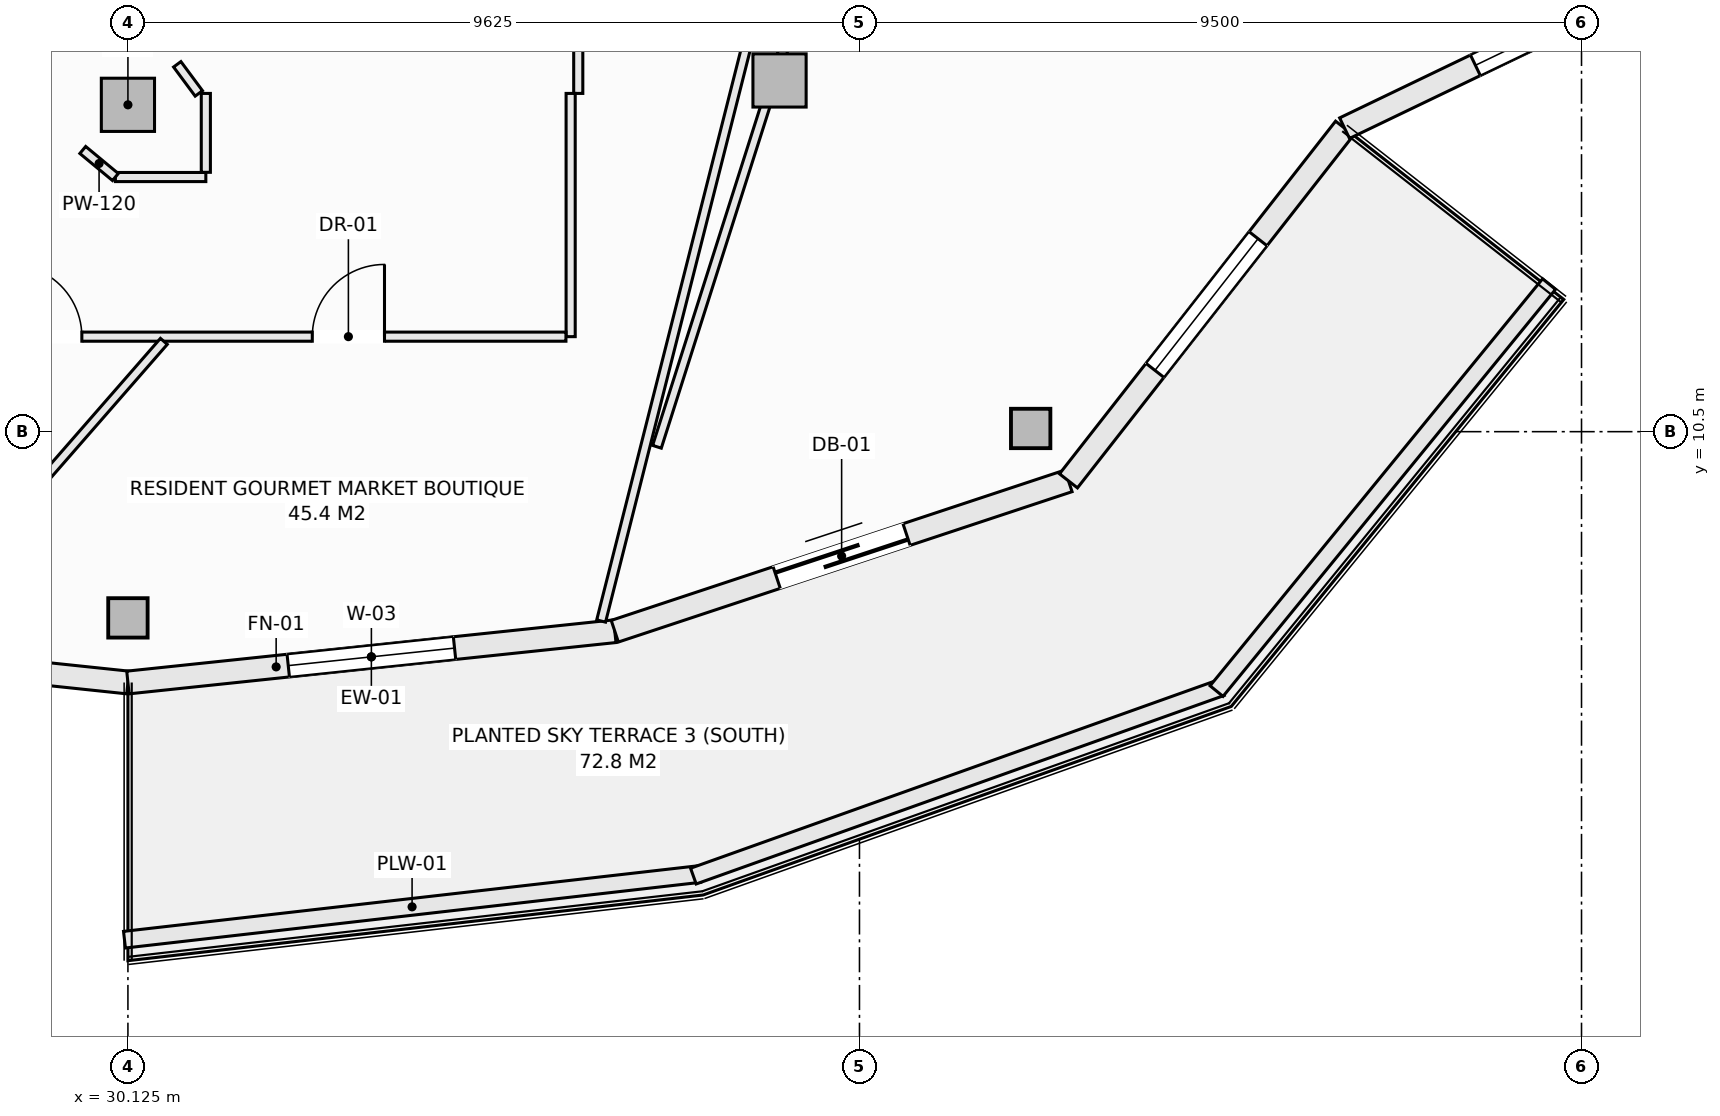
"""IFC4 building model, lengths in metres.
Left out: names, types, materials, properties, quantities, classifications, styles, units other than length and angle.
Written with IfcOpenShell. Run it as: python <this file> out.ifc"""

import sys

from ifc_helpers import new_model, si_unit, direction, frame, frame_2d, origin, origin_2d, place, context, subcontext, project, spatial, rectangle, hollow_rectangle, extrude, element, fill, save


model = new_model("IFC4")
c1 = context("Model", 3, precision=1e-05, world=origin(), true_north=direction((0.0, 1.0)))
c2 = subcontext(c1, "Body", "Model", "MODEL_VIEW")
j1 = project(units=[si_unit("LENGTHUNIT", "METRE"), si_unit("PLANEANGLEUNIT", "RADIAN")], contexts=[c1])
p1 = place(None, origin())
s1 = spatial("IfcSite", under=j1, at=p1, CompositionType="ELEMENT")
p2 = place(p1, origin())
s2 = spatial("IfcBuilding", under=s1, at=p2, CompositionType="ELEMENT")
p3 = place(p2, frame((0.0, 0.0, 236.0)))
s3 = spatial("IfcBuildingStorey", under=s2, at=p3, CompositionType="ELEMENT", Elevation=236.0)
for number, where, z_axis, x_axis in (
    (1, (30.125, 8.05, -0.27), (0.0, 0.0, 1.0), (1.0, 0.0, 0.0)),
    (2, (42.003, 10.542, -0.27), (0.0, 0.0, 1.0), (1.0, 0.0, 0.0)),
):
    element("IfcColumn", number, at=place(p3, frame(where, z_axis=z_axis, x_axis=x_axis)), inside=s3, PredefinedType="COLUMN", context=c2, shape_type="SweptSolid", body=[
        extrude(hollow_rectangle(XDim=0.508, YDim=0.508, WallThickness=0.019, at=origin_2d()), origin(), (0.0, 0.0, 1.0), 3.3),
    ])
for number, where, z_axis, x_axis in (
    (3, (30.125, 14.8, -0.27), (0.0, 0.0, 1.0), (1.0, 0.0, 0.0)),
    (4, (38.698, 15.121, -0.27), (0.0, 0.0, 1.0), (1.0, 0.0, 0.0)),
):
    element("IfcColumn", number, at=place(p3, frame(where, z_axis=z_axis, x_axis=x_axis)), inside=s3, PredefinedType="COLUMN", context=c2, shape_type="SweptSolid", body=[
        extrude(rectangle(XDim=0.7, YDim=0.7, at=origin_2d()), origin(), (0.0, 0.0, 1.0), 3.3),
    ])
p4 = place(p3, frame((23.719, 7.875, 0.0), z_axis=(0.0, 0.0, 1.0), x_axis=(0.994497142298, -0.104763705363, 0.0)))
e5 = element("IfcWall", 5, at=p4, inside=s3, PredefinedType="SOLIDWALL", context=c2, shape_type="SweptSolid", body=[
    extrude(rectangle(XDim=6.441, YDim=0.3, at=frame_2d((3.221, 0.0))), origin(), (0.0, 0.0, 1.0), 2.605),
])
p5 = place(p4, frame((0.85, 0.0, 0.72)))
e6 = element("IfcOpeningElement", 6, at=p5, cuts=e5, PredefinedType="OPENING", context=c2, shape_type="SweptSolid", body=[
    extrude(rectangle(XDim=2.2, YDim=1.65, at=frame_2d((1.1, 0.825))), frame((0.0, 0.16, 0.0), z_axis=(0.0, -1.0, 0.0), x_axis=(1.0, 0.0, 0.0)), (0.0, 0.0, 1.0), 0.32),
])
p6 = place(p3, frame((30.125, 7.2, 0.0), z_axis=(0.0, 0.0, 1.0), x_axis=(0.994497142298, 0.104763705363, 0.0)))
e7 = element("IfcWall", 7, at=p6, inside=s3, PredefinedType="SOLIDWALL", context=c2, shape_type="SweptSolid", body=[
    extrude(rectangle(XDim=6.441, YDim=0.3, at=frame_2d((3.221, 0.0))), origin(), (0.0, 0.0, 1.0), 2.605),
])
p7 = place(p6, frame((2.121, 0.0, 0.72)))
e8 = element("IfcOpeningElement", 8, at=p7, cuts=e7, PredefinedType="OPENING", context=c2, shape_type="SweptSolid", body=[
    extrude(rectangle(XDim=2.2, YDim=1.65, at=frame_2d((1.1, 0.825))), frame((0.0, 0.16, 0.0), z_axis=(0.0, -1.0, 0.0), x_axis=(1.0, 0.0, 0.0)), (0.0, 0.0, 1.0), 0.32),
])
p8 = place(p3, frame((36.531, 7.875, 0.0), z_axis=(0.0, 0.0, 1.0), x_axis=(0.949240877604, 0.314550085495, 0.0)))
e9 = element("IfcWall", 9, at=p8, inside=s3, PredefinedType="SOLIDWALL", context=c2, shape_type="SweptSolid", body=[
    extrude(rectangle(XDim=6.288, YDim=0.3, at=frame_2d((3.144, 0.0))), origin(), (0.0, 0.0, 1.0), 2.605),
])
p9 = place(p8, frame((2.244, 0.0, 0.0)))
e10 = element("IfcOpeningElement", 10, at=p9, cuts=e9, PredefinedType="OPENING", context=c2, shape_type="SweptSolid", body=[
    extrude(rectangle(XDim=1.8, YDim=2.25, at=frame_2d((0.9, 1.125))), frame((0.0, 0.16, 0.0), z_axis=(0.0, -1.0, 0.0), x_axis=(1.0, 0.0, 0.0)), (0.0, 0.0, 1.0), 0.32),
])
p10 = place(p3, frame((42.5, 9.853, 0.0), z_axis=(0.0, 0.0, 1.0), x_axis=(0.616450126935, 0.787393955401, 0.0)))
e11 = element("IfcWall", 11, at=p10, inside=s3, PredefinedType="SOLIDWALL", context=c2, shape_type="SweptSolid", body=[
    extrude(rectangle(XDim=5.893, YDim=0.3, at=frame_2d((2.946, 0.0))), origin(), (0.0, 0.0, 1.0), 2.605),
])
p11 = place(p10, frame((1.846, 0.0, 0.72)))
e12 = element("IfcOpeningElement", 12, at=p11, cuts=e11, PredefinedType="OPENING", context=c2, shape_type="SweptSolid", body=[
    extrude(rectangle(XDim=2.2, YDim=1.65, at=frame_2d((1.1, 0.825))), frame((0.0, 0.16, 0.0), z_axis=(0.0, -1.0, 0.0), x_axis=(1.0, 0.0, 0.0)), (0.0, 0.0, 1.0), 0.32),
])
p12 = place(p3, frame((46.133, 14.493, 0.0), z_axis=(0.0, 0.0, 1.0), x_axis=(0.901348331142, 0.433094892545, 0.0)))
e13 = element("IfcWall", 13, at=p12, inside=s3, PredefinedType="SOLIDWALL", context=c2, shape_type="SweptSolid", body=[
    extrude(rectangle(XDim=6.021, YDim=0.3, at=frame_2d((3.01, 0.0))), origin(), (0.0, 0.0, 1.0), 2.605),
])
p13 = place(p12, frame((1.91, 0.0, 0.72)))
e14 = element("IfcOpeningElement", 14, at=p13, cuts=e13, PredefinedType="OPENING", context=c2, shape_type="SweptSolid", body=[
    extrude(rectangle(XDim=2.2, YDim=1.65, at=frame_2d((1.1, 0.825))), frame((0.0, 0.16, 0.0), z_axis=(0.0, -1.0, 0.0), x_axis=(1.0, 0.0, 0.0)), (0.0, 0.0, 1.0), 0.32),
])
p14 = place(p3, frame((30.08, 3.816, 0.0), z_axis=(0.0, 0.0, 1.0), x_axis=(0.993546198781, 0.113428175021, 0.0)))
e15 = element("IfcWall", 15, at=p14, inside=s3, PredefinedType="PARAPET", context=c2, shape_type="SweptSolid", body=[
    extrude(rectangle(XDim=7.617, YDim=0.22, at=frame_2d((3.809, 0.0))), origin(), (0.0, 0.0, 1.0), 0.52),
])
p15 = place(p3, frame((37.565, 4.653, 0.0), z_axis=(0.0, 0.0, 1.0), x_axis=(0.941780086523, 0.336229488042, 0.0)))
e16 = element("IfcWall", 16, at=p15, inside=s3, PredefinedType="PARAPET", context=c2, shape_type="SweptSolid", body=[
    extrude(rectangle(XDim=7.378, YDim=0.22, at=frame_2d((3.689, 0.0))), origin(), (0.0, 0.0, 1.0), 0.52),
])
p16 = place(p3, frame((44.448, 7.087, 0.0), z_axis=(0.0, 0.0, 1.0), x_axis=(0.632697312147, 0.774399193699, 0.0)))
e17 = element("IfcWall", 17, at=p16, inside=s3, PredefinedType="PARAPET", context=c2, shape_type="SweptSolid", body=[
    extrude(rectangle(XDim=6.914, YDim=0.22, at=frame_2d((3.457, 0.0))), origin(), (0.0, 0.0, 1.0), 0.52),
])
p17 = place(p3, frame((36.05, 14.95, 0.0), z_axis=(0.0, 0.0, 1.0), x_axis=(0.0, 1.0, 0.0)))
e18 = element("IfcWall", 18, at=p17, inside=s3, PredefinedType="PARTITIONING", context=c2, shape_type="SweptSolid", body=[
    extrude(rectangle(XDim=2.593, YDim=0.12, at=frame_2d((1.296, 0.0))), origin(), (0.0, 0.0, 1.0), 3.03),
])
p18 = place(p3, frame((35.95, 11.75, 0.0), z_axis=(0.0, 0.0, 1.0), x_axis=(0.0, 1.0, 0.0)))
e19 = element("IfcWall", 19, at=p18, inside=s3, PredefinedType="PARTITIONING", context=c2, shape_type="SweptSolid", body=[
    extrude(rectangle(XDim=3.2, YDim=0.12, at=frame_2d((1.6, 0.0))), origin(), (0.0, 0.0, 1.0), 3.03),
])
p19 = place(p3, frame((27.227, 11.75, 0.0), z_axis=(0.0, 0.0, 1.0), x_axis=(1.0, 0.0, 0.0)))
e20 = element("IfcWall", 20, at=p19, inside=s3, PredefinedType="PARTITIONING", context=c2, shape_type="SweptSolid", body=[
    extrude(rectangle(XDim=8.661, YDim=0.12, at=frame_2d((4.331, 0.0))), origin(), (0.0, 0.0, 1.0), 3.03),
])
p20 = place(p19, frame((1.342, 0.0, 0.0)))
e21 = element("IfcOpeningElement", 21, at=p20, cuts=e20, PredefinedType="OPENING", context=c2, shape_type="SweptSolid", body=[
    extrude(rectangle(XDim=0.95, YDim=2.1, at=frame_2d((0.475, 1.05))), frame((0.0, 0.07, 0.0), z_axis=(0.0, -1.0, 0.0), x_axis=(1.0, 0.0, 0.0)), (0.0, 0.0, 1.0), 0.14),
])
p21 = place(p19, frame((5.324, 0.0, 0.0)))
e22 = element("IfcOpeningElement", 22, at=p21, cuts=e20, PredefinedType="OPENING", context=c2, shape_type="SweptSolid", body=[
    extrude(rectangle(XDim=0.95, YDim=2.1, at=frame_2d((0.475, 1.05))), frame((0.0, 0.07, 0.0), z_axis=(0.0, -1.0, 0.0), x_axis=(1.0, 0.0, 0.0)), (0.0, 0.0, 1.0), 0.14),
])
p22 = place(p3, frame((29.96, 13.85, 0.0), z_axis=(0.0, 0.0, 1.0), x_axis=(1.0, 0.0, 0.0)))
e23 = element("IfcWall", 23, at=p22, inside=s3, PredefinedType="PARTITIONING", context=c2, shape_type="SweptSolid", body=[
    extrude(rectangle(XDim=1.19, YDim=0.12, at=frame_2d((0.595, 0.0))), origin(), (0.0, 0.0, 1.0), 3.03),
])
p23 = place(p3, frame((31.15, 13.912, 0.0), z_axis=(0.0, 0.0, 1.0), x_axis=(0.0, 1.0, 0.0)))
e24 = element("IfcWall", 24, at=p23, inside=s3, PredefinedType="PARTITIONING", context=c2, shape_type="SweptSolid", body=[
    extrude(rectangle(XDim=1.038, YDim=0.12, at=frame_2d((0.519, 0.0))), origin(), (0.0, 0.0, 1.0), 3.03),
])
p24 = place(p3, frame((30.774, 15.333, 0.0), z_axis=(0.0, 0.0, 1.0), x_axis=(0.595814974861, -0.803121731577, 0.0)))
e25 = element("IfcWall", 25, at=p24, inside=s3, PredefinedType="PARTITIONING", context=c2, shape_type="SweptSolid", body=[
    extrude(rectangle(XDim=0.477, YDim=0.12, at=frame_2d((0.239, 0.0))), origin(), (0.0, 0.0, 1.0), 3.03),
])
p25 = place(p3, frame((29.531, 14.206, 0.0), z_axis=(0.0, 0.0, 1.0), x_axis=(0.7695479554, -0.638589026166, 0.0)))
e26 = element("IfcWall", 26, at=p25, inside=s3, PredefinedType="PARTITIONING", context=c2, shape_type="SweptSolid", body=[
    extrude(rectangle(XDim=0.557, YDim=0.12, at=frame_2d((0.279, 0.0))), origin(), (0.0, 0.0, 1.0), 3.03),
])
p26 = place(p3, frame((27.093, 7.672, 0.0), z_axis=(0.0, 0.0, 1.0), x_axis=(0.657573480864, 0.753390414901, 0.0)))
e27 = element("IfcWall", 27, at=p26, inside=s3, PredefinedType="PARTITIONING", context=c2, shape_type="SweptSolid", body=[
    extrude(rectangle(XDim=5.33, YDim=0.12, at=frame_2d((2.665, 0.0))), origin(), (0.0, 0.0, 1.0), 3.03),
])
p27 = place(p3, frame((36.351, 8.009, 0.0), z_axis=(0.0, 0.0, 1.0), x_axis=(0.245217392178, 0.969468117358, 0.0)))
e28 = element("IfcWall", 28, at=p27, inside=s3, PredefinedType="PARTITIONING", context=c2, shape_type="SweptSolid", body=[
    extrude(rectangle(XDim=9.914, YDim=0.12, at=frame_2d((4.957, 0.0))), origin(), (0.0, 0.0, 1.0), 3.03),
])
p28 = place(p3, frame((37.085, 10.301, 0.0), z_axis=(0.0, 0.0, 1.0), x_axis=(0.30335196171, 0.95287857953, 0.0)))
e29 = element("IfcWall", 29, at=p28, inside=s3, PredefinedType="PARTITIONING", context=c2, shape_type="SweptSolid", body=[
    extrude(rectangle(XDim=8.29, YDim=0.12, at=frame_2d((4.145, 0.0))), origin(), (0.0, 0.0, 1.0), 2.478),
])
p29 = place(p7, origin())
e30 = element("IfcWindow", 30, at=p29, inside=s3, PartitioningType="SINGLE_PANEL", PredefinedType="WINDOW", context=c2, shape_type="SweptSolid", body=[
    extrude(rectangle(XDim=2.2, YDim=1.65, at=frame_2d((1.1, 0.825))), frame((0.0, 0.03, 0.0), z_axis=(0.0, -1.0, 0.0), x_axis=(1.0, 0.0, 0.0)), (0.0, 0.0, 1.0), 0.06),
])
fill(e8, e30)
p30 = place(p9, frame((1.8, 0.0, 0.0), z_axis=(0.0, 0.0, 1.0), x_axis=(-1.0, 0.0, 0.0)))
e31 = element("IfcDoor", 31, at=p30, inside=s3, OperationType="SLIDING_TO_LEFT", PredefinedType="DOOR", context=c2, shape_type="SweptSolid", body=[
    extrude(rectangle(XDim=1.8, YDim=2.25, at=frame_2d((0.9, 1.125))), frame((0.0, 0.025, 0.0), z_axis=(0.0, -1.0, 0.0), x_axis=(1.0, 0.0, 0.0)), (0.0, 0.0, 1.0), 0.05),
])
fill(e10, e31)
p31 = place(p11, origin())
e32 = element("IfcWindow", 32, at=p31, inside=s3, PartitioningType="SINGLE_PANEL", PredefinedType="WINDOW", context=c2, shape_type="SweptSolid", body=[
    extrude(rectangle(XDim=2.2, YDim=1.65, at=frame_2d((1.1, 0.825))), frame((0.0, 0.03, 0.0), z_axis=(0.0, -1.0, 0.0), x_axis=(1.0, 0.0, 0.0)), (0.0, 0.0, 1.0), 0.06),
])
fill(e12, e32)
p32 = place(p13, origin())
e33 = element("IfcWindow", 33, at=p32, inside=s3, PartitioningType="SINGLE_PANEL", PredefinedType="WINDOW", context=c2, shape_type="SweptSolid", body=[
    extrude(rectangle(XDim=2.2, YDim=1.65, at=frame_2d((1.1, 0.825))), frame((0.0, 0.03, 0.0), z_axis=(0.0, -1.0, 0.0), x_axis=(1.0, 0.0, 0.0)), (0.0, 0.0, 1.0), 0.06),
])
fill(e14, e33)
p33 = place(p20, origin())
e34 = element("IfcDoor", 34, at=p33, inside=s3, OperationType="SINGLE_SWING_LEFT", PredefinedType="DOOR", context=c2, shape_type="SweptSolid", body=[
    extrude(rectangle(XDim=0.95, YDim=2.1, at=frame_2d((0.475, 1.05))), frame((0.0, 0.025, 0.0), z_axis=(0.0, -1.0, 0.0), x_axis=(1.0, 0.0, 0.0)), (0.0, 0.0, 1.0), 0.05),
])
fill(e21, e34)
p34 = place(p21, origin())
e35 = element("IfcDoor", 35, at=p34, inside=s3, OperationType="SINGLE_SWING_RIGHT", PredefinedType="DOOR", context=c2, shape_type="SweptSolid", body=[
    extrude(rectangle(XDim=0.95, YDim=2.1, at=frame_2d((0.475, 1.05))), frame((0.0, 0.025, 0.0), z_axis=(0.0, -1.0, 0.0), x_axis=(1.0, 0.0, 0.0)), (0.0, 0.0, 1.0), 0.05),
])
fill(e22, e35)
save(model, sys.argv[1])
